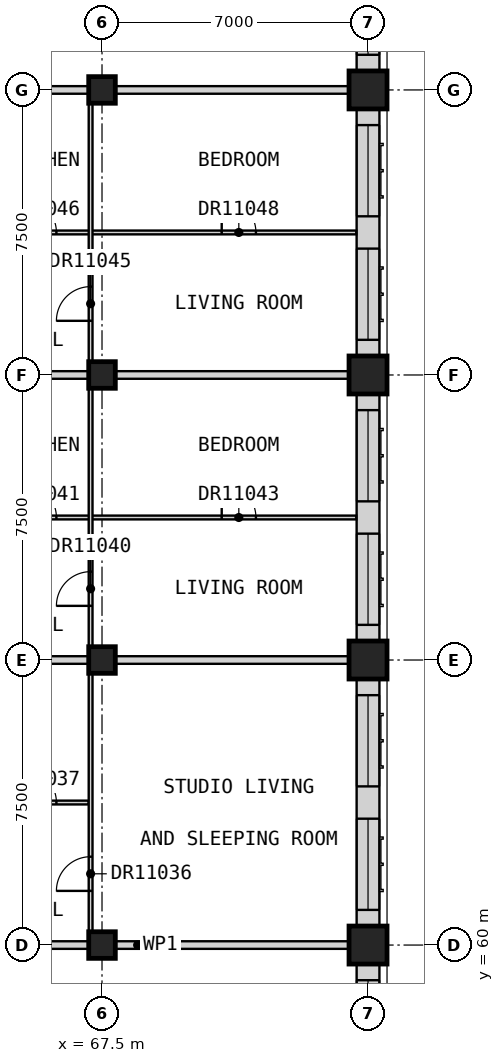
"""IFC4 building model, lengths in metres.
Left out: names, types, materials, properties, quantities, classifications, styles, units other than length and angle.
Written with IfcOpenShell. Run it as: python <this file> out.ifc"""

import sys

from ifc_helpers import new_model, si_unit, direction, frame, frame_2d, origin, origin_2d, place, context, subcontext, project, spatial, rectangle, extrude, element, fill, save


model = new_model("IFC4")
c1 = context("Model", 3, precision=1e-05, world=origin(), true_north=direction((0.0, 1.0)))
c2 = subcontext(c1, "Body", "Model", "MODEL_VIEW")
j1 = project(units=[si_unit("LENGTHUNIT", "METRE"), si_unit("PLANEANGLEUNIT", "RADIAN")], contexts=[c1])
p1 = place(None, origin())
s1 = spatial("IfcSite", under=j1, at=p1, CompositionType="ELEMENT")
p2 = place(p1, origin())
s2 = spatial("IfcBuilding", under=s1, at=p2, CompositionType="ELEMENT")
p3 = place(p2, frame((0.0, 0.0, 276.7)))
s3 = spatial("IfcBuildingStorey", under=s2, at=p3, CompositionType="ELEMENT", Elevation=276.7)
for number, where, z_axis, x_axis in (
    (1, (67.5, 60.0, 0.0), (0.0, 0.0, 1.0), (1.0, 0.0, 0.0)),
    (2, (67.5, 67.5, 0.0), (0.0, 0.0, 1.0), (1.0, 0.0, 0.0)),
    (3, (67.5, 75.0, 0.0), (0.0, 0.0, 1.0), (1.0, 0.0, 0.0)),
    (4, (67.5, 82.5, 0.0), (0.0, 0.0, 1.0), (1.0, 0.0, 0.0)),
):
    element("IfcColumn", number, at=place(p3, frame(where, z_axis=z_axis, x_axis=x_axis)), inside=s3, PredefinedType="COLUMN", context=c2, shape_type="SweptSolid", body=[
        extrude(rectangle(XDim=0.7, YDim=0.7, at=origin_2d()), origin(), (0.0, 0.0, 1.0), 3.5),
    ])
for number, where, z_axis, x_axis in (
    (5, (74.5, 60.0, 0.0), (0.0, 0.0, 1.0), (1.0, 0.0, 0.0)),
    (6, (74.5, 67.5, 0.0), (0.0, 0.0, 1.0), (1.0, 0.0, 0.0)),
    (7, (74.5, 75.0, 0.0), (0.0, 0.0, 1.0), (1.0, 0.0, 0.0)),
    (8, (74.5, 82.5, 0.0), (0.0, 0.0, 1.0), (1.0, 0.0, 0.0)),
):
    element("IfcColumn", number, at=place(p3, frame(where, z_axis=z_axis, x_axis=x_axis)), inside=s3, PredefinedType="COLUMN", context=c2, shape_type="SweptSolid", body=[
        extrude(rectangle(XDim=1.0, YDim=1.0, at=origin_2d()), origin(), (0.0, 0.0, 1.0), 3.5),
    ])
p4 = place(p3, frame((74.5, 53.0, 0.0), z_axis=(0.0, 0.0, 1.0), x_axis=(0.0, 1.0, 0.0)))
e9 = element("IfcWall", 9, at=p4, inside=s3, PredefinedType="SOLIDWALL", context=c2, shape_type="SweptSolid", body=[
    extrude(rectangle(XDim=6.5, YDim=0.6, at=frame_2d((3.25, 0.0))), origin(), (0.0, 0.0, 1.0), 2.75),
])
p5 = place(p4, frame((0.425, 0.0, 0.8)))
e10 = element("IfcOpeningElement", 10, at=p5, cuts=e9, PredefinedType="OPENING", context=c2, shape_type="SweptSolid", body=[
    extrude(rectangle(XDim=2.4, YDim=1.8, at=frame_2d((1.2, 0.9))), frame((0.0, 0.31, 0.0), z_axis=(0.0, -1.0, 0.0), x_axis=(1.0, 0.0, 0.0)), (0.0, 0.0, 1.0), 0.62),
])
p6 = place(p4, frame((3.675, 0.0, 0.8)))
e11 = element("IfcOpeningElement", 11, at=p6, cuts=e9, PredefinedType="OPENING", context=c2, shape_type="SweptSolid", body=[
    extrude(rectangle(XDim=2.4, YDim=1.8, at=frame_2d((1.2, 0.9))), frame((0.0, 0.31, 0.0), z_axis=(0.0, -1.0, 0.0), x_axis=(1.0, 0.0, 0.0)), (0.0, 0.0, 1.0), 0.62),
])
p7 = place(p3, frame((74.5, 60.5, 0.0), z_axis=(0.0, 0.0, 1.0), x_axis=(0.0, 1.0, 0.0)))
e12 = element("IfcWall", 12, at=p7, inside=s3, PredefinedType="SOLIDWALL", context=c2, shape_type="SweptSolid", body=[
    extrude(rectangle(XDim=6.5, YDim=0.6, at=frame_2d((3.25, 0.0))), origin(), (0.0, 0.0, 1.0), 2.75),
])
p8 = place(p7, frame((0.425, 0.0, 0.8)))
e13 = element("IfcOpeningElement", 13, at=p8, cuts=e12, PredefinedType="OPENING", context=c2, shape_type="SweptSolid", body=[
    extrude(rectangle(XDim=2.4, YDim=1.8, at=frame_2d((1.2, 0.9))), frame((0.0, 0.31, 0.0), z_axis=(0.0, -1.0, 0.0), x_axis=(1.0, 0.0, 0.0)), (0.0, 0.0, 1.0), 0.62),
])
p9 = place(p7, frame((3.675, 0.0, 0.8)))
e14 = element("IfcOpeningElement", 14, at=p9, cuts=e12, PredefinedType="OPENING", context=c2, shape_type="SweptSolid", body=[
    extrude(rectangle(XDim=2.4, YDim=1.8, at=frame_2d((1.2, 0.9))), frame((0.0, 0.31, 0.0), z_axis=(0.0, -1.0, 0.0), x_axis=(1.0, 0.0, 0.0)), (0.0, 0.0, 1.0), 0.62),
])
p10 = place(p3, frame((74.5, 68.0, 0.0), z_axis=(0.0, 0.0, 1.0), x_axis=(0.0, 1.0, 0.0)))
e15 = element("IfcWall", 15, at=p10, inside=s3, PredefinedType="SOLIDWALL", context=c2, shape_type="SweptSolid", body=[
    extrude(rectangle(XDim=6.5, YDim=0.6, at=frame_2d((3.25, 0.0))), origin(), (0.0, 0.0, 1.0), 2.75),
])
p11 = place(p10, frame((0.425, 0.0, 0.8)))
e16 = element("IfcOpeningElement", 16, at=p11, cuts=e15, PredefinedType="OPENING", context=c2, shape_type="SweptSolid", body=[
    extrude(rectangle(XDim=2.4, YDim=1.8, at=frame_2d((1.2, 0.9))), frame((0.0, 0.31, 0.0), z_axis=(0.0, -1.0, 0.0), x_axis=(1.0, 0.0, 0.0)), (0.0, 0.0, 1.0), 0.62),
])
p12 = place(p10, frame((3.675, 0.0, 0.8)))
e17 = element("IfcOpeningElement", 17, at=p12, cuts=e15, PredefinedType="OPENING", context=c2, shape_type="SweptSolid", body=[
    extrude(rectangle(XDim=2.4, YDim=1.8, at=frame_2d((1.2, 0.9))), frame((0.0, 0.31, 0.0), z_axis=(0.0, -1.0, 0.0), x_axis=(1.0, 0.0, 0.0)), (0.0, 0.0, 1.0), 0.62),
])
p13 = place(p3, frame((74.5, 75.5, 0.0), z_axis=(0.0, 0.0, 1.0), x_axis=(0.0, 1.0, 0.0)))
e18 = element("IfcWall", 18, at=p13, inside=s3, PredefinedType="SOLIDWALL", context=c2, shape_type="SweptSolid", body=[
    extrude(rectangle(XDim=6.5, YDim=0.6, at=frame_2d((3.25, 0.0))), origin(), (0.0, 0.0, 1.0), 2.75),
])
p14 = place(p13, frame((0.425, 0.0, 0.8)))
e19 = element("IfcOpeningElement", 19, at=p14, cuts=e18, PredefinedType="OPENING", context=c2, shape_type="SweptSolid", body=[
    extrude(rectangle(XDim=2.4, YDim=1.8, at=frame_2d((1.2, 0.9))), frame((0.0, 0.31, 0.0), z_axis=(0.0, -1.0, 0.0), x_axis=(1.0, 0.0, 0.0)), (0.0, 0.0, 1.0), 0.62),
])
p15 = place(p13, frame((3.675, 0.0, 0.8)))
e20 = element("IfcOpeningElement", 20, at=p15, cuts=e18, PredefinedType="OPENING", context=c2, shape_type="SweptSolid", body=[
    extrude(rectangle(XDim=2.4, YDim=1.8, at=frame_2d((1.2, 0.9))), frame((0.0, 0.31, 0.0), z_axis=(0.0, -1.0, 0.0), x_axis=(1.0, 0.0, 0.0)), (0.0, 0.0, 1.0), 0.62),
])
p16 = place(p3, frame((74.5, 83.0, 0.0), z_axis=(0.0, 0.0, 1.0), x_axis=(0.0, 1.0, 0.0)))
e21 = element("IfcWall", 21, at=p16, inside=s3, PredefinedType="SOLIDWALL", context=c2, shape_type="SweptSolid", body=[
    extrude(rectangle(XDim=6.5, YDim=0.6, at=frame_2d((3.25, 0.0))), origin(), (0.0, 0.0, 1.0), 2.75),
])
p17 = place(p16, frame((0.425, 0.0, 0.8)))
e22 = element("IfcOpeningElement", 22, at=p17, cuts=e21, PredefinedType="OPENING", context=c2, shape_type="SweptSolid", body=[
    extrude(rectangle(XDim=2.4, YDim=1.8, at=frame_2d((1.2, 0.9))), frame((0.0, 0.31, 0.0), z_axis=(0.0, -1.0, 0.0), x_axis=(1.0, 0.0, 0.0)), (0.0, 0.0, 1.0), 0.62),
])
p18 = place(p16, frame((3.675, 0.0, 0.8)))
e23 = element("IfcOpeningElement", 23, at=p18, cuts=e21, PredefinedType="OPENING", context=c2, shape_type="SweptSolid", body=[
    extrude(rectangle(XDim=2.4, YDim=1.8, at=frame_2d((1.2, 0.9))), frame((0.0, 0.31, 0.0), z_axis=(0.0, -1.0, 0.0), x_axis=(1.0, 0.0, 0.0)), (0.0, 0.0, 1.0), 0.62),
])
for number, where, z_axis, x_axis in (
    (24, (61.875, 60.0, 0.0), (0.0, 0.0, 1.0), (1.0, 0.0, 0.0)),
    (25, (61.875, 67.5, 0.0), (0.0, 0.0, 1.0), (1.0, 0.0, 0.0)),
    (26, (61.875, 75.0, 0.0), (0.0, 0.0, 1.0), (1.0, 0.0, 0.0)),
    (27, (61.875, 82.5, 0.0), (0.0, 0.0, 1.0), (1.0, 0.0, 0.0)),
):
    element("IfcWall", number, at=place(p3, frame(where, z_axis=z_axis, x_axis=x_axis)), inside=s3, PredefinedType="PARTITIONING", context=c2, shape_type="SweptSolid", body=[
        extrude(rectangle(XDim=13.125, YDim=0.2, at=frame_2d((6.562, 0.0))), origin(), (0.0, 0.0, 1.0), 3.25),
    ])
p19 = place(p3, frame((64.562, 63.75, 0.0), z_axis=(0.0, 0.0, 1.0), x_axis=(1.0, 0.0, 0.0)))
e28 = element("IfcWall", 28, at=p19, inside=s3, PredefinedType="PARTITIONING", context=c2, shape_type="SweptSolid", body=[
    extrude(rectangle(XDim=2.587, YDim=0.1, at=frame_2d((1.294, 0.0))), origin(), (0.0, 0.0, 1.0), 3.25),
])
p20 = place(p19, frame((0.837, 0.0, 0.0)))
e29 = element("IfcOpeningElement", 29, at=p20, cuts=e28, PredefinedType="OPENING", context=c2, shape_type="SweptSolid", body=[
    extrude(rectangle(XDim=0.9, YDim=2.1, at=frame_2d((0.45, 1.05))), frame((0.0, 0.06, 0.0), z_axis=(0.0, -1.0, 0.0), x_axis=(1.0, 0.0, 0.0)), (0.0, 0.0, 1.0), 0.12),
])
p21 = place(p3, frame((64.562, 71.25, 0.0), z_axis=(0.0, 0.0, 1.0), x_axis=(1.0, 0.0, 0.0)))
e30 = element("IfcWall", 30, at=p21, inside=s3, PredefinedType="PARTITIONING", context=c2, shape_type="SweptSolid", body=[
    extrude(rectangle(XDim=9.627, YDim=0.1, at=frame_2d((4.814, 0.0))), origin(), (0.0, 0.0, 1.0), 3.25),
])
p22 = place(p21, frame((0.837, 0.0, 0.0)))
e31 = element("IfcOpeningElement", 31, at=p22, cuts=e30, PredefinedType="OPENING", context=c2, shape_type="SweptSolid", body=[
    extrude(rectangle(XDim=0.9, YDim=2.1, at=frame_2d((0.45, 1.05))), frame((0.0, 0.06, 0.0), z_axis=(0.0, -1.0, 0.0), x_axis=(1.0, 0.0, 0.0)), (0.0, 0.0, 1.0), 0.12),
])
p23 = place(p21, frame((6.087, 0.0, 0.0)))
e32 = element("IfcOpeningElement", 32, at=p23, cuts=e30, PredefinedType="OPENING", context=c2, shape_type="SweptSolid", body=[
    extrude(rectangle(XDim=0.9, YDim=2.1, at=frame_2d((0.45, 1.05))), frame((0.0, 0.06, 0.0), z_axis=(0.0, -1.0, 0.0), x_axis=(1.0, 0.0, 0.0)), (0.0, 0.0, 1.0), 0.12),
])
p24 = place(p3, frame((64.562, 78.75, 0.0), z_axis=(0.0, 0.0, 1.0), x_axis=(1.0, 0.0, 0.0)))
e33 = element("IfcWall", 33, at=p24, inside=s3, PredefinedType="PARTITIONING", context=c2, shape_type="SweptSolid", body=[
    extrude(rectangle(XDim=9.627, YDim=0.1, at=frame_2d((4.814, 0.0))), origin(), (0.0, 0.0, 1.0), 3.25),
])
p25 = place(p24, frame((0.837, 0.0, 0.0)))
e34 = element("IfcOpeningElement", 34, at=p25, cuts=e33, PredefinedType="OPENING", context=c2, shape_type="SweptSolid", body=[
    extrude(rectangle(XDim=0.9, YDim=2.1, at=frame_2d((0.45, 1.05))), frame((0.0, 0.06, 0.0), z_axis=(0.0, -1.0, 0.0), x_axis=(1.0, 0.0, 0.0)), (0.0, 0.0, 1.0), 0.12),
])
p26 = place(p24, frame((6.087, 0.0, 0.0)))
e35 = element("IfcOpeningElement", 35, at=p26, cuts=e33, PredefinedType="OPENING", context=c2, shape_type="SweptSolid", body=[
    extrude(rectangle(XDim=0.9, YDim=2.1, at=frame_2d((0.45, 1.05))), frame((0.0, 0.06, 0.0), z_axis=(0.0, -1.0, 0.0), x_axis=(1.0, 0.0, 0.0)), (0.0, 0.0, 1.0), 0.12),
])
p27 = place(p3, frame((67.2, 60.1, 0.0), z_axis=(0.0, 0.0, 1.0), x_axis=(0.0, 1.0, 0.0)))
e36 = element("IfcWall", 36, at=p27, inside=s3, PredefinedType="PARTITIONING", context=c2, shape_type="SweptSolid", body=[
    extrude(rectangle(XDim=22.3, YDim=0.1, at=frame_2d((11.15, 0.0))), origin(), (0.0, 0.0, 1.0), 3.25),
])
p28 = place(p27, frame((1.325, 0.0, 0.0)))
e37 = element("IfcOpeningElement", 37, at=p28, cuts=e36, PredefinedType="OPENING", context=c2, shape_type="SweptSolid", body=[
    extrude(rectangle(XDim=0.9, YDim=2.1, at=frame_2d((0.45, 1.05))), frame((0.0, 0.06, 0.0), z_axis=(0.0, -1.0, 0.0), x_axis=(1.0, 0.0, 0.0)), (0.0, 0.0, 1.0), 0.12),
])
p29 = place(p27, frame((8.825, 0.0, 0.0)))
e38 = element("IfcOpeningElement", 38, at=p29, cuts=e36, PredefinedType="OPENING", context=c2, shape_type="SweptSolid", body=[
    extrude(rectangle(XDim=0.9, YDim=2.1, at=frame_2d((0.45, 1.05))), frame((0.0, 0.06, 0.0), z_axis=(0.0, -1.0, 0.0), x_axis=(1.0, 0.0, 0.0)), (0.0, 0.0, 1.0), 0.12),
])
p30 = place(p27, frame((16.325, 0.0, 0.0)))
e39 = element("IfcOpeningElement", 39, at=p30, cuts=e36, PredefinedType="OPENING", context=c2, shape_type="SweptSolid", body=[
    extrude(rectangle(XDim=0.9, YDim=2.1, at=frame_2d((0.45, 1.05))), frame((0.0, 0.06, 0.0), z_axis=(0.0, -1.0, 0.0), x_axis=(1.0, 0.0, 0.0)), (0.0, 0.0, 1.0), 0.12),
])
p31 = place(p6, origin())
e40 = element("IfcWindow", 40, at=p31, inside=s3, PartitioningType="SINGLE_PANEL", PredefinedType="WINDOW", context=c2, shape_type="SweptSolid", body=[
    extrude(rectangle(XDim=2.4, YDim=1.8, at=frame_2d((1.2, 0.9))), frame((0.0, -0.07, 0.0), z_axis=(0.0, -1.0, 0.0), x_axis=(1.0, 0.0, 0.0)), (0.0, 0.0, 1.0), 0.06),
])
fill(e11, e40)
p32 = place(p8, origin())
e41 = element("IfcWindow", 41, at=p32, inside=s3, PartitioningType="SINGLE_PANEL", PredefinedType="WINDOW", context=c2, shape_type="SweptSolid", body=[
    extrude(rectangle(XDim=2.4, YDim=1.8, at=frame_2d((1.2, 0.9))), frame((0.0, -0.07, 0.0), z_axis=(0.0, -1.0, 0.0), x_axis=(1.0, 0.0, 0.0)), (0.0, 0.0, 1.0), 0.06),
])
fill(e13, e41)
p33 = place(p9, origin())
e42 = element("IfcWindow", 42, at=p33, inside=s3, PartitioningType="SINGLE_PANEL", PredefinedType="WINDOW", context=c2, shape_type="SweptSolid", body=[
    extrude(rectangle(XDim=2.4, YDim=1.8, at=frame_2d((1.2, 0.9))), frame((0.0, -0.07, 0.0), z_axis=(0.0, -1.0, 0.0), x_axis=(1.0, 0.0, 0.0)), (0.0, 0.0, 1.0), 0.06),
])
fill(e14, e42)
p34 = place(p11, origin())
e43 = element("IfcWindow", 43, at=p34, inside=s3, PartitioningType="SINGLE_PANEL", PredefinedType="WINDOW", context=c2, shape_type="SweptSolid", body=[
    extrude(rectangle(XDim=2.4, YDim=1.8, at=frame_2d((1.2, 0.9))), frame((0.0, -0.07, 0.0), z_axis=(0.0, -1.0, 0.0), x_axis=(1.0, 0.0, 0.0)), (0.0, 0.0, 1.0), 0.06),
])
fill(e16, e43)
p35 = place(p12, origin())
e44 = element("IfcWindow", 44, at=p35, inside=s3, PartitioningType="SINGLE_PANEL", PredefinedType="WINDOW", context=c2, shape_type="SweptSolid", body=[
    extrude(rectangle(XDim=2.4, YDim=1.8, at=frame_2d((1.2, 0.9))), frame((0.0, -0.07, 0.0), z_axis=(0.0, -1.0, 0.0), x_axis=(1.0, 0.0, 0.0)), (0.0, 0.0, 1.0), 0.06),
])
fill(e17, e44)
p36 = place(p14, origin())
e45 = element("IfcWindow", 45, at=p36, inside=s3, PartitioningType="SINGLE_PANEL", PredefinedType="WINDOW", context=c2, shape_type="SweptSolid", body=[
    extrude(rectangle(XDim=2.4, YDim=1.8, at=frame_2d((1.2, 0.9))), frame((0.0, -0.07, 0.0), z_axis=(0.0, -1.0, 0.0), x_axis=(1.0, 0.0, 0.0)), (0.0, 0.0, 1.0), 0.06),
])
fill(e19, e45)
p37 = place(p15, origin())
e46 = element("IfcWindow", 46, at=p37, inside=s3, PartitioningType="SINGLE_PANEL", PredefinedType="WINDOW", context=c2, shape_type="SweptSolid", body=[
    extrude(rectangle(XDim=2.4, YDim=1.8, at=frame_2d((1.2, 0.9))), frame((0.0, -0.07, 0.0), z_axis=(0.0, -1.0, 0.0), x_axis=(1.0, 0.0, 0.0)), (0.0, 0.0, 1.0), 0.06),
])
fill(e20, e46)
p38 = place(p17, origin())
e47 = element("IfcWindow", 47, at=p38, inside=s3, PartitioningType="SINGLE_PANEL", PredefinedType="WINDOW", context=c2, shape_type="SweptSolid", body=[
    extrude(rectangle(XDim=2.4, YDim=1.8, at=frame_2d((1.2, 0.9))), frame((0.0, -0.07, 0.0), z_axis=(0.0, -1.0, 0.0), x_axis=(1.0, 0.0, 0.0)), (0.0, 0.0, 1.0), 0.06),
])
fill(e22, e47)
p39 = place(p28, origin())
e48 = element("IfcDoor", 48, at=p39, inside=s3, OperationType="SINGLE_SWING_LEFT", PredefinedType="DOOR", context=c2, shape_type="SweptSolid", body=[
    extrude(rectangle(XDim=0.9, YDim=2.1, at=frame_2d((0.45, 1.05))), frame((0.0, 0.025, 0.0), z_axis=(0.0, -1.0, 0.0), x_axis=(1.0, 0.0, 0.0)), (0.0, 0.0, 1.0), 0.05),
])
fill(e37, e48)
p40 = place(p20, origin())
e49 = element("IfcDoor", 49, at=p40, inside=s3, OperationType="SINGLE_SWING_LEFT", PredefinedType="DOOR", context=c2, shape_type="SweptSolid", body=[
    extrude(rectangle(XDim=0.9, YDim=2.1, at=frame_2d((0.45, 1.05))), frame((0.0, 0.025, 0.0), z_axis=(0.0, -1.0, 0.0), x_axis=(1.0, 0.0, 0.0)), (0.0, 0.0, 1.0), 0.05),
])
fill(e29, e49)
p41 = place(p29, origin())
e50 = element("IfcDoor", 50, at=p41, inside=s3, OperationType="SINGLE_SWING_LEFT", PredefinedType="DOOR", context=c2, shape_type="SweptSolid", body=[
    extrude(rectangle(XDim=0.9, YDim=2.1, at=frame_2d((0.45, 1.05))), frame((0.0, 0.025, 0.0), z_axis=(0.0, -1.0, 0.0), x_axis=(1.0, 0.0, 0.0)), (0.0, 0.0, 1.0), 0.05),
])
fill(e38, e50)
p42 = place(p22, origin())
e51 = element("IfcDoor", 51, at=p42, inside=s3, OperationType="SINGLE_SWING_LEFT", PredefinedType="DOOR", context=c2, shape_type="SweptSolid", body=[
    extrude(rectangle(XDim=0.9, YDim=2.1, at=frame_2d((0.45, 1.05))), frame((0.0, 0.025, 0.0), z_axis=(0.0, -1.0, 0.0), x_axis=(1.0, 0.0, 0.0)), (0.0, 0.0, 1.0), 0.05),
])
fill(e31, e51)
p43 = place(p23, origin())
e52 = element("IfcDoor", 52, at=p43, inside=s3, OperationType="SINGLE_SWING_RIGHT", PredefinedType="DOOR", context=c2, shape_type="SweptSolid", body=[
    extrude(rectangle(XDim=0.9, YDim=2.1, at=frame_2d((0.45, 1.05))), frame((0.0, 0.025, 0.0), z_axis=(0.0, -1.0, 0.0), x_axis=(1.0, 0.0, 0.0)), (0.0, 0.0, 1.0), 0.05),
])
fill(e32, e52)
p44 = place(p30, origin())
e53 = element("IfcDoor", 53, at=p44, inside=s3, OperationType="SINGLE_SWING_LEFT", PredefinedType="DOOR", context=c2, shape_type="SweptSolid", body=[
    extrude(rectangle(XDim=0.9, YDim=2.1, at=frame_2d((0.45, 1.05))), frame((0.0, 0.025, 0.0), z_axis=(0.0, -1.0, 0.0), x_axis=(1.0, 0.0, 0.0)), (0.0, 0.0, 1.0), 0.05),
])
fill(e39, e53)
p45 = place(p25, origin())
e54 = element("IfcDoor", 54, at=p45, inside=s3, OperationType="SINGLE_SWING_LEFT", PredefinedType="DOOR", context=c2, shape_type="SweptSolid", body=[
    extrude(rectangle(XDim=0.9, YDim=2.1, at=frame_2d((0.45, 1.05))), frame((0.0, 0.025, 0.0), z_axis=(0.0, -1.0, 0.0), x_axis=(1.0, 0.0, 0.0)), (0.0, 0.0, 1.0), 0.05),
])
fill(e34, e54)
p46 = place(p26, origin())
e55 = element("IfcDoor", 55, at=p46, inside=s3, OperationType="SINGLE_SWING_RIGHT", PredefinedType="DOOR", context=c2, shape_type="SweptSolid", body=[
    extrude(rectangle(XDim=0.9, YDim=2.1, at=frame_2d((0.45, 1.05))), frame((0.0, 0.025, 0.0), z_axis=(0.0, -1.0, 0.0), x_axis=(1.0, 0.0, 0.0)), (0.0, 0.0, 1.0), 0.05),
])
fill(e35, e55)
save(model, sys.argv[1])
